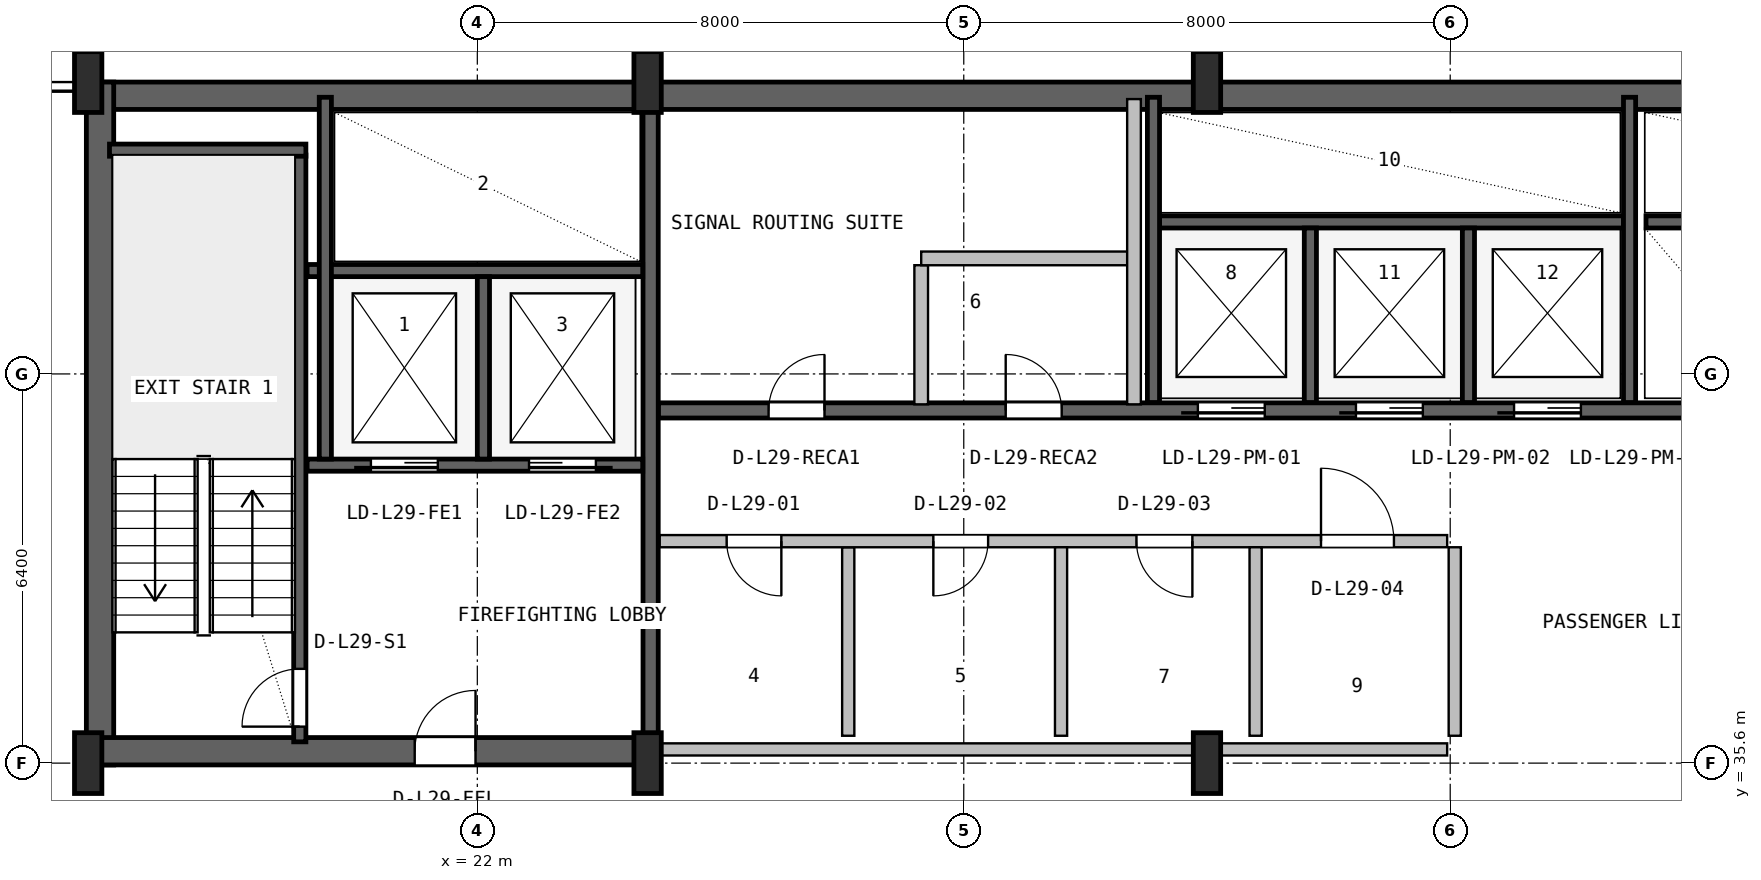
"""IFC4 building model, lengths in metres.
Left out: names, types, materials, properties, quantities, classifications, styles, units other than length and angle.
Written with IfcOpenShell. Run it as: python <this file> out.ifc"""

import sys

from ifc_helpers import new_model, si_unit, direction, frame, frame_2d, origin, origin_2d, place, context, subcontext, project, spatial, rectangle, i_section, extrude, source, transform, mapped, element, fill, save


model = new_model("IFC4")
c1 = context("Model", 3, precision=1e-05, world=origin(), true_north=direction((0.0, 1.0)))
c2 = subcontext(c1, "Body", "Model", "MODEL_VIEW")
j1 = project(units=[si_unit("LENGTHUNIT", "METRE"), si_unit("PLANEANGLEUNIT", "RADIAN")], contexts=[c1])
p1 = place(None, origin())
s1 = spatial("IfcSite", under=j1, at=p1, CompositionType="ELEMENT")
p2 = place(p1, origin())
s2 = spatial("IfcBuilding", under=s1, at=p2, CompositionType="ELEMENT")
p3 = place(p2, frame((0.0, 0.0, 122.0)))
s3 = spatial("IfcBuildingStorey", under=s2, at=p3, CompositionType="ELEMENT", Elevation=122.0)
p4 = place(p3, frame((15.6, 46.575, 0.0), z_axis=(0.0, 0.0, 1.0), x_axis=(1.0, 0.0, 0.0)))
e1 = element("IfcWall", 1, at=p4, inside=s3, PredefinedType="SHEAR", context=c2, shape_type="SweptSolid", body=[
    extrude(rectangle(XDim=36.8, YDim=0.45, at=frame_2d((18.4, 0.0))), origin(), (0.0, 0.0, 1.0), 3.55),
])
p5 = place(p3, frame((15.795, 35.57, 0.0), z_axis=(0.0, 0.0, 1.0), x_axis=(0.0, 1.0, 0.0)))
e2 = element("IfcWall", 2, at=p5, inside=s3, PredefinedType="SHEAR", context=c2, shape_type="SweptSolid", body=[
    extrude(rectangle(XDim=11.23, YDim=0.45, at=frame_2d((5.615, 0.0))), origin(), (0.0, 0.0, 1.0), 3.55),
])
p6 = place(p3, frame((15.57, 35.795, 0.0), z_axis=(0.0, 0.0, 1.0), x_axis=(1.0, 0.0, 0.0)))
e3 = element("IfcWall", 3, at=p6, inside=s3, PredefinedType="SHEAR", context=c2, shape_type="SweptSolid", body=[
    extrude(rectangle(XDim=9.23, YDim=0.45, at=frame_2d((4.615, 0.0))), origin(), (0.0, 0.0, 1.0), 3.55),
])
p7 = place(p6, frame((5.4, 0.0, 0.0)))
e4 = element("IfcOpeningElement", 4, at=p7, cuts=e3, PredefinedType="OPENING", context=c2, shape_type="SweptSolid", body=[
    extrude(rectangle(XDim=1.0, YDim=2.1, at=frame_2d((0.5, 1.05))), frame((0.0, 0.235, 0.0), z_axis=(0.0, -1.0, 0.0), x_axis=(1.0, 0.0, 0.0)), (0.0, 0.0, 1.0), 0.47),
])
m1 = source(origin(), c2, "Body", "SweptSolid", [
    extrude(i_section(OverallWidth=0.45, OverallDepth=1.0, WebThickness=0.016, FlangeThickness=0.03, FilletRadius=0.016, at=origin_2d()), origin(), (0.0, 0.0, 1.0), 3.8),
])
for number, where, z_axis, x_axis in (
    (5, (15.6, 35.6, 0.0), (0.0, 0.0, 1.0), (1.0, 0.0, 0.0)),
    (6, (15.6, 46.8, 0.0), (0.0, 0.0, 1.0), (1.0, 0.0, 0.0)),
    (7, (24.8, 35.6, 0.0), (0.0, 0.0, 1.0), (1.0, 0.0, 0.0)),
    (8, (24.8, 46.8, 0.0), (0.0, 0.0, 1.0), (1.0, 0.0, 0.0)),
    (9, (34.0, 35.6, 0.0), (0.0, 0.0, 1.0), (1.0, 0.0, 0.0)),
    (10, (34.0, 46.8, 0.0), (0.0, 0.0, 1.0), (1.0, 0.0, 0.0)),
):
    element("IfcColumn", number, at=place(p3, frame(where, z_axis=z_axis, x_axis=x_axis)), inside=s3, PredefinedType="COLUMN", context=c2, shape_type="MappedRepresentation", body=[
        mapped(m1, transform((0.0, 0.0, 0.0), x_axis=(1.0, 0.0, 0.0), y_axis=(0.0, 1.0, 0.0), z_axis=(0.0, 0.0, 1.0), scale=1.0)),
    ])
p8 = place(p3, frame((19.08, 35.95, 0.0), z_axis=(0.0, 0.0, 1.0), x_axis=(0.0, 1.0, 0.0)))
e11 = element("IfcWall", 11, at=p8, inside=s3, PredefinedType="SHEAR", context=c2, shape_type="SweptSolid", body=[
    extrude(rectangle(XDim=9.65, YDim=0.2, at=frame_2d((4.825, 0.0))), origin(), (0.0, 0.0, 1.0), 3.55),
])
p9 = place(p8, frame((0.25, 0.0, 0.0)))
e12 = element("IfcOpeningElement", 12, at=p9, cuts=e11, PredefinedType="OPENING", context=c2, shape_type="SweptSolid", body=[
    extrude(rectangle(XDim=0.95, YDim=2.1, at=frame_2d((0.475, 1.05))), frame((0.0, 0.11, 0.0), z_axis=(0.0, -1.0, 0.0), x_axis=(1.0, 0.0, 0.0)), (0.0, 0.0, 1.0), 0.22),
])
p10 = place(p3, frame((15.95, 45.68, 0.0), z_axis=(0.0, 0.0, 1.0), x_axis=(1.0, 0.0, 0.0)))
e13 = element("IfcWall", 13, at=p10, inside=s3, PredefinedType="SHEAR", context=c2, shape_type="SweptSolid", body=[
    extrude(rectangle(XDim=3.23, YDim=0.2, at=frame_2d((1.615, 0.0))), origin(), (0.0, 0.0, 1.0), 3.55),
])
p11 = place(p3, frame((24.85, 36.05, 0.0), z_axis=(0.0, 0.0, 1.0), x_axis=(0.0, 1.0, 0.0)))
e14 = element("IfcWall", 14, at=p11, inside=s3, PredefinedType="SHEAR", context=c2, shape_type="SweptSolid", body=[
    extrude(rectangle(XDim=10.45, YDim=0.25, at=frame_2d((5.225, 0.0))), origin(), (0.0, 0.0, 1.0), 3.55),
])
p12 = place(p3, frame((19.2, 40.5, 0.0), z_axis=(0.0, 0.0, 1.0), x_axis=(1.0, 0.0, 0.0)))
e15 = element("IfcWall", 15, at=p12, inside=s3, PredefinedType="SHEAR", context=c2, shape_type="SweptSolid", body=[
    extrude(rectangle(XDim=5.52, YDim=0.2, at=frame_2d((2.76, 0.0))), origin(), (0.0, 0.0, 1.0), 3.55),
])
p13 = place(p12, frame((1.05, 0.0, 0.0)))
e16 = element("IfcOpeningElement", 16, at=p13, cuts=e15, PredefinedType="OPENING", context=c2, shape_type="SweptSolid", body=[
    extrude(rectangle(XDim=1.1, YDim=2.18, at=frame_2d((0.55, 1.09))), frame((0.0, 0.11, 0.0), z_axis=(0.0, -1.0, 0.0), x_axis=(1.0, 0.0, 0.0)), (0.0, 0.0, 1.0), 0.22),
])
p14 = place(p12, frame((3.65, 0.0, 0.0)))
e17 = element("IfcOpeningElement", 17, at=p14, cuts=e15, PredefinedType="OPENING", context=c2, shape_type="SweptSolid", body=[
    extrude(rectangle(XDim=1.1, YDim=2.18, at=frame_2d((0.55, 1.09))), frame((0.0, 0.11, 0.0), z_axis=(0.0, -1.0, 0.0), x_axis=(1.0, 0.0, 0.0)), (0.0, 0.0, 1.0), 0.22),
])
p15 = place(p3, frame((19.2, 43.7, 0.0), z_axis=(0.0, 0.0, 1.0), x_axis=(1.0, 0.0, 0.0)))
e18 = element("IfcWall", 18, at=p15, inside=s3, PredefinedType="SHEAR", context=c2, shape_type="SweptSolid", body=[
    extrude(rectangle(XDim=5.52, YDim=0.2, at=frame_2d((2.76, 0.0))), origin(), (0.0, 0.0, 1.0), 3.55),
])
p16 = place(p3, frame((22.1, 40.6, 0.0), z_axis=(0.0, 0.0, 1.0), x_axis=(0.0, 1.0, 0.0)))
e19 = element("IfcWall", 19, at=p16, inside=s3, PredefinedType="SHEAR", context=c2, shape_type="SweptSolid", body=[
    extrude(rectangle(XDim=3.0, YDim=0.2, at=frame_2d((1.5, 0.0))), origin(), (0.0, 0.0, 1.0), 3.55),
])
p17 = place(p3, frame((19.5, 40.6, 0.0), z_axis=(0.0, 0.0, 1.0), x_axis=(0.0, 1.0, 0.0)))
e20 = element("IfcWall", 20, at=p17, inside=s3, PredefinedType="SHEAR", context=c2, shape_type="SweptSolid", body=[
    extrude(rectangle(XDim=5.95, YDim=0.2, at=frame_2d((2.975, 0.0))), origin(), (0.0, 0.0, 1.0), 3.55),
])
p18 = place(p3, frame((24.98, 41.4, 0.0), z_axis=(0.0, 0.0, 1.0), x_axis=(1.0, 0.0, 0.0)))
e21 = element("IfcWall", 21, at=p18, inside=s3, PredefinedType="SHEAR", context=c2, shape_type="SweptSolid", body=[
    extrude(rectangle(XDim=23.82, YDim=0.25, at=frame_2d((11.91, 0.0))), origin(), (0.0, 0.0, 1.0), 3.55),
])
p19 = place(p18, frame((8.87, 0.0, 0.0)))
e22 = element("IfcOpeningElement", 22, at=p19, cuts=e21, PredefinedType="OPENING", context=c2, shape_type="SweptSolid", body=[
    extrude(rectangle(XDim=1.1, YDim=2.18, at=frame_2d((0.55, 1.09))), frame((0.0, 0.135, 0.0), z_axis=(0.0, -1.0, 0.0), x_axis=(1.0, 0.0, 0.0)), (0.0, 0.0, 1.0), 0.27),
])
p20 = place(p18, frame((11.47, 0.0, 0.0)))
e23 = element("IfcOpeningElement", 23, at=p20, cuts=e21, PredefinedType="OPENING", context=c2, shape_type="SweptSolid", body=[
    extrude(rectangle(XDim=1.1, YDim=2.18, at=frame_2d((0.55, 1.09))), frame((0.0, 0.135, 0.0), z_axis=(0.0, -1.0, 0.0), x_axis=(1.0, 0.0, 0.0)), (0.0, 0.0, 1.0), 0.27),
])
p21 = place(p18, frame((14.07, 0.0, 0.0)))
e24 = element("IfcOpeningElement", 24, at=p21, cuts=e21, PredefinedType="OPENING", context=c2, shape_type="SweptSolid", body=[
    extrude(rectangle(XDim=1.1, YDim=2.18, at=frame_2d((0.55, 1.09))), frame((0.0, 0.135, 0.0), z_axis=(0.0, -1.0, 0.0), x_axis=(1.0, 0.0, 0.0)), (0.0, 0.0, 1.0), 0.27),
])
p22 = place(p18, frame((1.81, 0.0, 0.0)))
e25 = element("IfcOpeningElement", 25, at=p22, cuts=e21, PredefinedType="OPENING", context=c2, shape_type="SweptSolid", body=[
    extrude(rectangle(XDim=0.92, YDim=2.08, at=frame_2d((0.46, 1.04))), frame((0.0, 0.135, 0.0), z_axis=(0.0, -1.0, 0.0), x_axis=(1.0, 0.0, 0.0)), (0.0, 0.0, 1.0), 0.27),
])
p23 = place(p18, frame((5.71, 0.0, 0.0)))
e26 = element("IfcOpeningElement", 26, at=p23, cuts=e21, PredefinedType="OPENING", context=c2, shape_type="SweptSolid", body=[
    extrude(rectangle(XDim=0.92, YDim=2.08, at=frame_2d((0.46, 1.04))), frame((0.0, 0.135, 0.0), z_axis=(0.0, -1.0, 0.0), x_axis=(1.0, 0.0, 0.0)), (0.0, 0.0, 1.0), 0.27),
])
p24 = place(p3, frame((33.22, 44.5, 0.0), z_axis=(0.0, 0.0, 1.0), x_axis=(1.0, 0.0, 0.0)))
e27 = element("IfcWall", 27, at=p24, inside=s3, PredefinedType="SHEAR", context=c2, shape_type="SweptSolid", body=[
    extrude(rectangle(XDim=7.63, YDim=0.2, at=frame_2d((3.815, 0.0))), origin(), (0.0, 0.0, 1.0), 3.55),
])
p25 = place(p3, frame((33.12, 41.53, 0.0), z_axis=(0.0, 0.0, 1.0), x_axis=(0.0, 1.0, 0.0)))
e28 = element("IfcWall", 28, at=p25, inside=s3, PredefinedType="SHEAR", context=c2, shape_type="SweptSolid", body=[
    extrude(rectangle(XDim=5.02, YDim=0.2, at=frame_2d((2.51, 0.0))), origin(), (0.0, 0.0, 1.0), 3.55),
])
for number, where, z_axis, x_axis in (
    (29, (35.7, 41.53, 0.0), (0.0, 0.0, 1.0), (0.0, 1.0, 0.0)),
    (30, (38.3, 41.53, 0.0), (0.0, 0.0, 1.0), (0.0, 1.0, 0.0)),
):
    element("IfcWall", number, at=place(p3, frame(where, z_axis=z_axis, x_axis=x_axis)), inside=s3, PredefinedType="SHEAR", context=c2, shape_type="SweptSolid", body=[
        extrude(rectangle(XDim=2.87, YDim=0.2, at=frame_2d((1.435, 0.0))), origin(), (0.0, 0.0, 1.0), 3.55),
    ])
p26 = place(p3, frame((40.95, 41.53, 0.0), z_axis=(0.0, 0.0, 1.0), x_axis=(0.0, 1.0, 0.0)))
e31 = element("IfcWall", 31, at=p26, inside=s3, PredefinedType="SHEAR", context=c2, shape_type="SweptSolid", body=[
    extrude(rectangle(XDim=5.02, YDim=0.2, at=frame_2d((2.51, 0.0))), origin(), (0.0, 0.0, 1.0), 3.55),
])
p27 = place(p3, frame((41.22, 44.5, 0.0), z_axis=(0.0, 0.0, 1.0), x_axis=(1.0, 0.0, 0.0)))
e32 = element("IfcWall", 32, at=p27, inside=s3, PredefinedType="SHEAR", context=c2, shape_type="SweptSolid", body=[
    extrude(rectangle(XDim=7.58, YDim=0.2, at=frame_2d((3.79, 0.0))), origin(), (0.0, 0.0, 1.0), 3.55),
])
p28 = place(p3, frame((25.0, 35.825, 0.0), z_axis=(0.0, 0.0, 1.0), x_axis=(1.0, 0.0, 0.0)))
e33 = element("IfcWall", 33, at=p28, inside=s3, PredefinedType="SOLIDWALL", context=c2, shape_type="SweptSolid", body=[
    extrude(rectangle(XDim=12.95, YDim=0.2, at=frame_2d((6.475, 0.0))), origin(), (0.0, 0.0, 1.0), 2.325),
])
p29 = place(p3, frame((28.1, 36.05, 0.0), z_axis=(0.0, 0.0, 1.0), x_axis=(0.0, 1.0, 0.0)))
e34 = element("IfcWall", 34, at=p29, inside=s3, PredefinedType="PLUMBINGWALL", context=c2, shape_type="SweptSolid", body=[
    extrude(rectangle(XDim=3.1, YDim=0.2, at=frame_2d((1.55, 0.0))), origin(), (0.0, 0.0, 1.0), 3.53),
])
p30 = place(p3, frame((25.0, 39.25, 0.0), z_axis=(0.0, 0.0, 1.0), x_axis=(1.0, 0.0, 0.0)))
e35 = element("IfcWall", 35, at=p30, inside=s3, PredefinedType="SOLIDWALL", context=c2, shape_type="SweptSolid", body=[
    extrude(rectangle(XDim=12.95, YDim=0.2, at=frame_2d((6.475, 0.0))), origin(), (0.0, 0.0, 1.0), 3.53),
])
p31 = place(p30, frame((1.1, 0.0, 0.0)))
e36 = element("IfcOpeningElement", 36, at=p31, cuts=e35, PredefinedType="OPENING", context=c2, shape_type="SweptSolid", body=[
    extrude(rectangle(XDim=0.9, YDim=2.06, at=frame_2d((0.45, 1.03))), frame((0.0, 0.11, 0.0), z_axis=(0.0, -1.0, 0.0), x_axis=(1.0, 0.0, 0.0)), (0.0, 0.0, 1.0), 0.22),
])
p32 = place(p30, frame((4.5, 0.0, 0.0)))
e37 = element("IfcOpeningElement", 37, at=p32, cuts=e35, PredefinedType="OPENING", context=c2, shape_type="SweptSolid", body=[
    extrude(rectangle(XDim=0.9, YDim=2.06, at=frame_2d((0.45, 1.03))), frame((0.0, 0.11, 0.0), z_axis=(0.0, -1.0, 0.0), x_axis=(1.0, 0.0, 0.0)), (0.0, 0.0, 1.0), 0.22),
])
p33 = place(p30, frame((7.84, 0.0, 0.0)))
e38 = element("IfcOpeningElement", 38, at=p33, cuts=e35, PredefinedType="OPENING", context=c2, shape_type="SweptSolid", body=[
    extrude(rectangle(XDim=0.92, YDim=2.08, at=frame_2d((0.46, 1.04))), frame((0.0, 0.11, 0.0), z_axis=(0.0, -1.0, 0.0), x_axis=(1.0, 0.0, 0.0)), (0.0, 0.0, 1.0), 0.22),
])
p34 = place(p30, frame((10.875, 0.0, 0.0)))
e39 = element("IfcOpeningElement", 39, at=p34, cuts=e35, PredefinedType="OPENING", context=c2, shape_type="SweptSolid", body=[
    extrude(rectangle(XDim=1.2, YDim=2.1, at=frame_2d((0.6, 1.05))), frame((0.0, 0.11, 0.0), z_axis=(0.0, -1.0, 0.0), x_axis=(1.0, 0.0, 0.0)), (0.0, 0.0, 1.0), 0.22),
])
p35 = place(p3, frame((31.6, 36.05, 0.0), z_axis=(0.0, 0.0, 1.0), x_axis=(0.0, 1.0, 0.0)))
e40 = element("IfcWall", 40, at=p35, inside=s3, PredefinedType="PLUMBINGWALL", context=c2, shape_type="SweptSolid", body=[
    extrude(rectangle(XDim=3.1, YDim=0.2, at=frame_2d((1.55, 0.0))), origin(), (0.0, 0.0, 1.0), 3.53),
])
for number, where, z_axis, x_axis in (
    (41, (34.8, 36.05, 0.0), (0.0, 0.0, 1.0), (0.0, 1.0, 0.0)),
    (42, (38.075, 36.05, 0.0), (0.0, 0.0, 1.0), (0.0, 1.0, 0.0)),
):
    element("IfcWall", number, at=place(p3, frame(where, z_axis=z_axis, x_axis=x_axis)), inside=s3, PredefinedType="SOLIDWALL", context=c2, shape_type="SweptSolid", body=[
        extrude(rectangle(XDim=3.1, YDim=0.2, at=frame_2d((1.55, 0.0))), origin(), (0.0, 0.0, 1.0), 3.53),
    ])
p36 = place(p3, frame((29.3, 41.5, 0.0), z_axis=(0.0, 0.0, 1.0), x_axis=(0.0, 1.0, 0.0)))
e43 = element("IfcWall", 43, at=p36, inside=s3, PredefinedType="PARTITIONING", context=c2, shape_type="SweptSolid", body=[
    extrude(rectangle(XDim=2.288, YDim=0.225, at=frame_2d((1.144, 0.0))), origin(), (0.0, 0.0, 1.0), 3.53),
])
p37 = place(p3, frame((29.3, 43.9, 0.0), z_axis=(0.0, 0.0, 1.0), x_axis=(1.0, 0.0, 0.0)))
e44 = element("IfcWall", 44, at=p37, inside=s3, PredefinedType="PARTITIONING", context=c2, shape_type="SweptSolid", body=[
    extrude(rectangle(XDim=3.5, YDim=0.225, at=frame_2d((1.75, 0.0))), origin(), (0.0, 0.0, 1.0), 3.53),
])
p38 = place(p3, frame((32.8, 41.5, 0.0), z_axis=(0.0, 0.0, 1.0), x_axis=(0.0, 1.0, 0.0)))
e45 = element("IfcWall", 45, at=p38, inside=s3, PredefinedType="PARTITIONING", context=c2, shape_type="SweptSolid", body=[
    extrude(rectangle(XDim=5.02, YDim=0.225, at=frame_2d((2.51, 0.0))), origin(), (0.0, 0.0, 1.0), 3.53),
])
m2 = source(origin(), c2, "Body", "SweptSolid", [
    extrude(rectangle(XDim=0.95, YDim=2.1, at=frame_2d((0.475, 1.05))), frame((0.0, 0.025, 0.0), z_axis=(0.0, -1.0, 0.0), x_axis=(1.0, 0.0, 0.0)), (0.0, 0.0, 1.0), 0.05),
])
p39 = place(p9, origin())
e46 = element("IfcDoor", 46, at=p39, inside=s3, OperationType="SINGLE_SWING_LEFT", PredefinedType="DOOR", context=c2, shape_type="MappedRepresentation", body=[
    mapped(m2, transform((0.0, 0.0, 0.0), x_axis=(1.0, 0.0, 0.0), y_axis=(0.0, 1.0, 0.0), z_axis=(0.0, 0.0, 1.0), scale=1.0)),
])
fill(e12, e46)
m3 = source(origin(), c2, "Body", "SweptSolid", [
    extrude(rectangle(XDim=1.0, YDim=2.1, at=frame_2d((0.5, 1.05))), frame((0.0, 0.025, 0.0), z_axis=(0.0, -1.0, 0.0), x_axis=(1.0, 0.0, 0.0)), (0.0, 0.0, 1.0), 0.05),
])
p40 = place(p7, origin())
e47 = element("IfcDoor", 47, at=p40, inside=s3, OperationType="SINGLE_SWING_RIGHT", PredefinedType="DOOR", context=c2, shape_type="MappedRepresentation", body=[
    mapped(m3, transform((0.0, 0.0, 0.0), x_axis=(1.0, 0.0, 0.0), y_axis=(0.0, 1.0, 0.0), z_axis=(0.0, 0.0, 1.0), scale=1.0)),
])
fill(e4, e47)
m4 = source(origin(), c2, "Body", "SweptSolid", [
    extrude(rectangle(XDim=1.1, YDim=2.18, at=frame_2d((0.55, 1.09))), frame((0.0, 0.025, 0.0), z_axis=(0.0, -1.0, 0.0), x_axis=(1.0, 0.0, 0.0)), (0.0, 0.0, 1.0), 0.05),
])
p41 = place(p13, frame((1.1, 0.0, 0.0), z_axis=(0.0, 0.0, 1.0), x_axis=(-1.0, 0.0, 0.0)))
e48 = element("IfcDoor", 48, at=p41, inside=s3, OperationType="SLIDING_TO_LEFT", PredefinedType="DOOR", context=c2, shape_type="MappedRepresentation", body=[
    mapped(m4, transform((0.0, 0.0, 0.0), x_axis=(1.0, 0.0, 0.0), y_axis=(0.0, 1.0, 0.0), z_axis=(0.0, 0.0, 1.0), scale=1.0)),
])
fill(e16, e48)
p42 = place(p14, frame((1.1, 0.0, 0.0), z_axis=(0.0, 0.0, 1.0), x_axis=(-1.0, 0.0, 0.0)))
e49 = element("IfcDoor", 49, at=p42, inside=s3, OperationType="SLIDING_TO_RIGHT", PredefinedType="DOOR", context=c2, shape_type="MappedRepresentation", body=[
    mapped(m4, transform((0.0, 0.0, 0.0), x_axis=(1.0, 0.0, 0.0), y_axis=(0.0, 1.0, 0.0), z_axis=(0.0, 0.0, 1.0), scale=1.0)),
])
fill(e17, e49)
p43 = place(p19, frame((1.1, 0.0, 0.0), z_axis=(0.0, 0.0, 1.0), x_axis=(-1.0, 0.0, 0.0)))
e50 = element("IfcDoor", 50, at=p43, inside=s3, OperationType="SLIDING_TO_LEFT", PredefinedType="DOOR", context=c2, shape_type="MappedRepresentation", body=[
    mapped(m4, transform((0.0, 0.0, 0.0), x_axis=(1.0, 0.0, 0.0), y_axis=(0.0, 1.0, 0.0), z_axis=(0.0, 0.0, 1.0), scale=1.0)),
])
fill(e22, e50)
p44 = place(p20, frame((1.1, 0.0, 0.0), z_axis=(0.0, 0.0, 1.0), x_axis=(-1.0, 0.0, 0.0)))
e51 = element("IfcDoor", 51, at=p44, inside=s3, OperationType="SLIDING_TO_LEFT", PredefinedType="DOOR", context=c2, shape_type="MappedRepresentation", body=[
    mapped(m4, transform((0.0, 0.0, 0.0), x_axis=(1.0, 0.0, 0.0), y_axis=(0.0, 1.0, 0.0), z_axis=(0.0, 0.0, 1.0), scale=1.0)),
])
fill(e23, e51)
p45 = place(p21, frame((1.1, 0.0, 0.0), z_axis=(0.0, 0.0, 1.0), x_axis=(-1.0, 0.0, 0.0)))
e52 = element("IfcDoor", 52, at=p45, inside=s3, OperationType="SLIDING_TO_LEFT", PredefinedType="DOOR", context=c2, shape_type="MappedRepresentation", body=[
    mapped(m4, transform((0.0, 0.0, 0.0), x_axis=(1.0, 0.0, 0.0), y_axis=(0.0, 1.0, 0.0), z_axis=(0.0, 0.0, 1.0), scale=1.0)),
])
fill(e24, e52)
m5 = source(origin(), c2, "Body", "SweptSolid", [
    extrude(rectangle(XDim=0.92, YDim=2.08, at=frame_2d((0.46, 1.04))), frame((0.0, 0.025, 0.0), z_axis=(0.0, -1.0, 0.0), x_axis=(1.0, 0.0, 0.0)), (0.0, 0.0, 1.0), 0.05),
])
p46 = place(p22, origin())
e53 = element("IfcDoor", 53, at=p46, inside=s3, OperationType="SINGLE_SWING_RIGHT", PredefinedType="DOOR", context=c2, shape_type="MappedRepresentation", body=[
    mapped(m5, transform((0.0, 0.0, 0.0), x_axis=(1.0, 0.0, 0.0), y_axis=(0.0, 1.0, 0.0), z_axis=(0.0, 0.0, 1.0), scale=1.0)),
])
fill(e25, e53)
p47 = place(p23, origin())
e54 = element("IfcDoor", 54, at=p47, inside=s3, OperationType="SINGLE_SWING_LEFT", PredefinedType="DOOR", context=c2, shape_type="MappedRepresentation", body=[
    mapped(m5, transform((0.0, 0.0, 0.0), x_axis=(1.0, 0.0, 0.0), y_axis=(0.0, 1.0, 0.0), z_axis=(0.0, 0.0, 1.0), scale=1.0)),
])
fill(e26, e54)
m6 = source(origin(), c2, "Body", "SweptSolid", [
    extrude(rectangle(XDim=0.9, YDim=2.06, at=frame_2d((0.45, 1.03))), frame((0.0, 0.025, 0.0), z_axis=(0.0, -1.0, 0.0), x_axis=(1.0, 0.0, 0.0)), (0.0, 0.0, 1.0), 0.05),
])
p48 = place(p31, frame((0.9, 0.0, 0.0), z_axis=(0.0, 0.0, 1.0), x_axis=(-1.0, 0.0, 0.0)))
e55 = element("IfcDoor", 55, at=p48, inside=s3, OperationType="SINGLE_SWING_RIGHT", PredefinedType="DOOR", context=c2, shape_type="MappedRepresentation", body=[
    mapped(m6, transform((0.0, 0.0, 0.0), x_axis=(1.0, 0.0, 0.0), y_axis=(0.0, 1.0, 0.0), z_axis=(0.0, 0.0, 1.0), scale=1.0)),
])
fill(e36, e55)
p49 = place(p32, frame((0.9, 0.0, 0.0), z_axis=(0.0, 0.0, 1.0), x_axis=(-1.0, 0.0, 0.0)))
e56 = element("IfcDoor", 56, at=p49, inside=s3, OperationType="SINGLE_SWING_LEFT", PredefinedType="DOOR", context=c2, shape_type="MappedRepresentation", body=[
    mapped(m6, transform((0.0, 0.0, 0.0), x_axis=(1.0, 0.0, 0.0), y_axis=(0.0, 1.0, 0.0), z_axis=(0.0, 0.0, 1.0), scale=1.0)),
])
fill(e37, e56)
p50 = place(p33, frame((0.92, 0.0, 0.0), z_axis=(0.0, 0.0, 1.0), x_axis=(-1.0, 0.0, 0.0)))
e57 = element("IfcDoor", 57, at=p50, inside=s3, OperationType="SINGLE_SWING_RIGHT", PredefinedType="DOOR", context=c2, shape_type="MappedRepresentation", body=[
    mapped(m5, transform((0.0, 0.0, 0.0), x_axis=(1.0, 0.0, 0.0), y_axis=(0.0, 1.0, 0.0), z_axis=(0.0, 0.0, 1.0), scale=1.0)),
])
fill(e38, e57)
m7 = source(origin(), c2, "Body", "SweptSolid", [
    extrude(rectangle(XDim=1.2, YDim=2.1, at=frame_2d((0.6, 1.05))), frame((0.0, 0.025, 0.0), z_axis=(0.0, -1.0, 0.0), x_axis=(1.0, 0.0, 0.0)), (0.0, 0.0, 1.0), 0.05),
])
p51 = place(p34, origin())
e58 = element("IfcDoor", 58, at=p51, inside=s3, OperationType="SINGLE_SWING_LEFT", PredefinedType="DOOR", context=c2, shape_type="MappedRepresentation", body=[
    mapped(m7, transform((0.0, 0.0, 0.0), x_axis=(1.0, 0.0, 0.0), y_axis=(0.0, 1.0, 0.0), z_axis=(0.0, 0.0, 1.0), scale=1.0)),
])
fill(e39, e58)
save(model, sys.argv[1])
